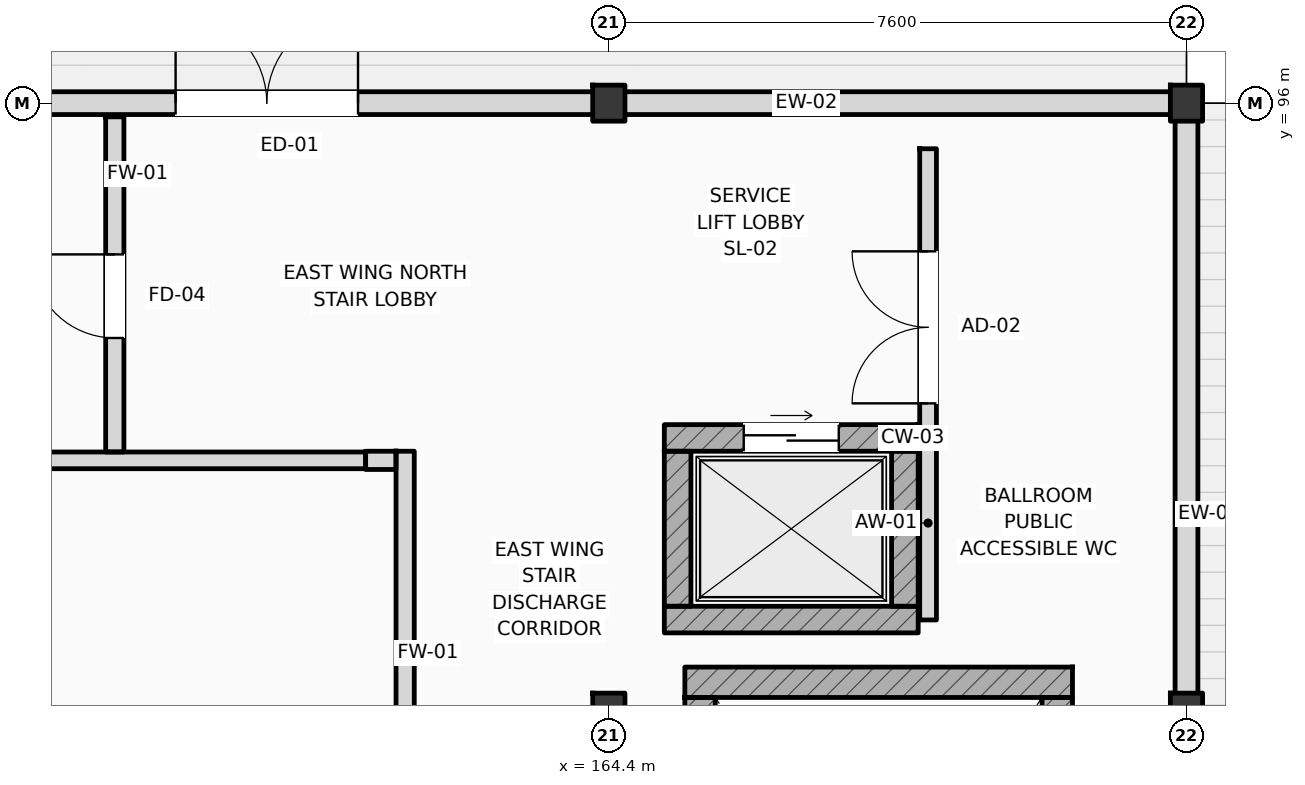
"""IFC4 building model, lengths in metres.
Left out: names, types, materials, properties, quantities, classifications, styles, units other than length and angle.
Written with IfcOpenShell. Run it as: python <this file> out.ifc"""

import sys

from ifc_helpers import new_model, si_unit, direction, frame, frame_2d, origin, origin_2d, place, context, subcontext, project, spatial, rectangle, i_section, extrude, element, fill, save


model = new_model("IFC4")
c1 = context("Model", 3, precision=1e-05, world=origin(), true_north=direction((0.0, 1.0)))
c2 = subcontext(c1, "Body", "Model", "MODEL_VIEW")
j1 = project(units=[si_unit("LENGTHUNIT", "METRE"), si_unit("PLANEANGLEUNIT", "RADIAN")], contexts=[c1])
p1 = place(None, origin())
s1 = spatial("IfcSite", under=j1, at=p1, CompositionType="ELEMENT")
p2 = place(p1, origin())
s2 = spatial("IfcBuilding", under=s1, at=p2, CompositionType="ELEMENT")
p3 = place(p2, origin())
s3 = spatial("IfcBuildingStorey", under=s2, at=p3, CompositionType="ELEMENT", Elevation=0.0)
for number, where, z_axis, x_axis in (
    (1, (164.4, 88.0, 0.0), (0.0, 0.0, 1.0), (1.0, 0.0, 0.0)),
    (2, (164.4, 96.0, 0.0), (0.0, 0.0, 1.0), (1.0, 0.0, 0.0)),
    (3, (172.0, 88.0, 0.0), (0.0, 0.0, 1.0), (1.0, 0.0, 0.0)),
    (4, (172.0, 96.0, 0.0), (0.0, 0.0, 1.0), (1.0, 0.0, 0.0)),
):
    element("IfcColumn", number, at=place(p3, frame(where, z_axis=z_axis, x_axis=x_axis)), inside=s3, PredefinedType="COLUMN", context=c2, shape_type="SweptSolid", body=[
        extrude(i_section(OverallWidth=0.424, OverallDepth=0.474, WebThickness=0.045, FlangeThickness=0.055, FilletRadius=0.015, at=origin_2d()), origin(), (0.0, 0.0, 1.0), 6.0),
    ])
p4 = place(p3, frame((165.4, 88.38, 0.0), z_axis=(0.0, 0.0, 1.0), x_axis=(1.0, 0.0, 0.0)))
e5 = element("IfcWall", 5, at=p4, inside=s3, PredefinedType="SHEAR", context=c2, shape_type="SweptSolid", body=[
    extrude(rectangle(XDim=5.1, YDim=0.4, at=frame_2d((2.55, 0.0))), origin(), (0.0, 0.0, 1.0), 6.0),
])
p5 = place(p3, frame((165.6, 79.6, 0.0), z_axis=(0.0, 0.0, 1.0), x_axis=(0.0, 1.0, 0.0)))
e6 = element("IfcWall", 6, at=p5, inside=s3, PredefinedType="SHEAR", context=c2, shape_type="SweptSolid", body=[
    extrude(rectangle(XDim=8.58, YDim=0.4, at=frame_2d((4.29, 0.0))), origin(), (0.0, 0.0, 1.0), 6.0),
])
p6 = place(p5, frame((0.225, 0.0, 0.0)))
e7 = element("IfcOpeningElement", 7, at=p6, cuts=e6, PredefinedType="OPENING", context=c2, shape_type="SweptSolid", body=[
    extrude(rectangle(XDim=1.6, YDim=2.2, at=frame_2d((0.8, 1.1))), frame((0.0, 0.21, 0.0), z_axis=(0.0, -1.0, 0.0), x_axis=(1.0, 0.0, 0.0)), (0.0, 0.0, 1.0), 0.42),
])
p7 = place(p3, frame((170.3, 79.6, 0.0), z_axis=(0.0, 0.0, 1.0), x_axis=(0.0, 1.0, 0.0)))
e8 = element("IfcWall", 8, at=p7, inside=s3, PredefinedType="SHEAR", context=c2, shape_type="SweptSolid", body=[
    extrude(rectangle(XDim=8.58, YDim=0.4, at=frame_2d((4.29, 0.0))), origin(), (0.0, 0.0, 1.0), 6.0),
])
p8 = place(p3, frame((155.4, 96.0, 0.0), z_axis=(0.0, 0.0, 1.0), x_axis=(1.0, 0.0, 0.0)))
e9 = element("IfcWall", 9, at=p8, inside=s3, PredefinedType="STANDARD", context=c2, shape_type="SweptSolid", body=[
    extrude(rectangle(XDim=9.0, YDim=0.3, at=frame_2d((4.5, 0.0))), origin(), (0.0, 0.0, 1.0), 5.09),
])
p9 = place(p8, frame((3.3, 0.0, 0.0)))
e10 = element("IfcOpeningElement", 10, at=p9, cuts=e9, PredefinedType="OPENING", context=c2, shape_type="SweptSolid", body=[
    extrude(rectangle(XDim=2.4, YDim=2.6, at=frame_2d((1.2, 1.3))), frame((0.0, 0.16, 0.0), z_axis=(0.0, -1.0, 0.0), x_axis=(1.0, 0.0, 0.0)), (0.0, 0.0, 1.0), 0.32),
])
p10 = place(p3, frame((164.4, 96.0, 0.0), z_axis=(0.0, 0.0, 1.0), x_axis=(1.0, 0.0, 0.0)))
e11 = element("IfcWall", 11, at=p10, inside=s3, PredefinedType="STANDARD", context=c2, shape_type="SweptSolid", body=[
    extrude(rectangle(XDim=7.6, YDim=0.3, at=frame_2d((3.8, 0.0))), origin(), (0.0, 0.0, 1.0), 5.19),
])
p11 = place(p3, frame((172.0, 88.0, 0.0), z_axis=(0.0, 0.0, 1.0), x_axis=(0.0, 1.0, 0.0)))
e12 = element("IfcWall", 12, at=p11, inside=s3, PredefinedType="STANDARD", context=c2, shape_type="SweptSolid", body=[
    extrude(rectangle(XDim=8.0, YDim=0.3, at=frame_2d((4.0, 0.0))), origin(), (0.0, 0.0, 1.0), 5.24),
])
p12 = place(p3, frame((165.13, 91.595, 0.0), z_axis=(0.0, 0.0, 1.0), x_axis=(1.0, 0.0, 0.0)))
e13 = element("IfcWall", 13, at=p12, inside=s3, PredefinedType="SHEAR", context=c2, shape_type="SweptSolid", body=[
    extrude(rectangle(XDim=3.34, YDim=0.35, at=frame_2d((1.67, 0.0))), origin(), (0.0, 0.0, 1.0), 5.7),
])
p13 = place(p12, frame((1.045, 0.0, 0.0)))
e14 = element("IfcOpeningElement", 14, at=p13, cuts=e13, PredefinedType="OPENING", context=c2, shape_type="SweptSolid", body=[
    extrude(rectangle(XDim=1.25, YDim=2.25, at=frame_2d((0.625, 1.125))), frame((0.0, 0.185, 0.0), z_axis=(0.0, -1.0, 0.0), x_axis=(1.0, 0.0, 0.0)), (0.0, 0.0, 1.0), 0.37),
])
p14 = place(p3, frame((165.13, 89.205, 0.0), z_axis=(0.0, 0.0, 1.0), x_axis=(1.0, 0.0, 0.0)))
e15 = element("IfcWall", 15, at=p14, inside=s3, PredefinedType="SHEAR", context=c2, shape_type="SweptSolid", body=[
    extrude(rectangle(XDim=3.34, YDim=0.35, at=frame_2d((1.67, 0.0))), origin(), (0.0, 0.0, 1.0), 5.7),
])
for number, where, z_axis, x_axis in (
    (16, (165.305, 89.38, 0.0), (0.0, 0.0, 1.0), (0.0, 1.0, 0.0)),
    (17, (168.295, 89.38, 0.0), (0.0, 0.0, 1.0), (0.0, 1.0, 0.0)),
):
    element("IfcWall", number, at=place(p3, frame(where, z_axis=z_axis, x_axis=x_axis)), inside=s3, PredefinedType="SHEAR", context=c2, shape_type="SweptSolid", body=[
        extrude(rectangle(XDim=2.04, YDim=0.35, at=frame_2d((1.02, 0.0))), origin(), (0.0, 0.0, 1.0), 5.7),
    ])
p15 = place(p3, frame((129.0, 91.3, 0.0), z_axis=(0.0, 0.0, 1.0), x_axis=(1.0, 0.0, 0.0)))
e18 = element("IfcWall", 18, at=p15, inside=s3, PredefinedType="PARTITIONING", context=c2, shape_type="SweptSolid", body=[
    extrude(rectangle(XDim=32.2, YDim=0.22, at=frame_2d((16.1, 0.0))), origin(), (0.0, 0.0, 1.0), 5.7),
])
p16 = place(p15, frame((15.1, 0.0, 0.0)))
e19 = element("IfcOpeningElement", 19, at=p16, cuts=e18, PredefinedType="OPENING", context=c2, shape_type="SweptSolid", body=[
    extrude(rectangle(XDim=2.0, YDim=2.35, at=frame_2d((1.0, 1.175))), frame((0.0, 0.12, 0.0), z_axis=(0.0, -1.0, 0.0), x_axis=(1.0, 0.0, 0.0)), (0.0, 0.0, 1.0), 0.24),
])
p17 = place(p3, frame((168.6, 89.2, 0.0), z_axis=(0.0, 0.0, 1.0), x_axis=(0.0, 1.0, 0.0)))
e20 = element("IfcWall", 20, at=p17, inside=s3, PredefinedType="PARTITIONING", context=c2, shape_type="SweptSolid", body=[
    extrude(rectangle(XDim=6.2, YDim=0.22, at=frame_2d((3.1, 0.0))), origin(), (0.0, 0.0, 1.0), 5.7),
])
p18 = place(p17, frame((2.85, 0.0, 0.0)))
e21 = element("IfcOpeningElement", 21, at=p18, cuts=e20, PredefinedType="OPENING", context=c2, shape_type="SweptSolid", body=[
    extrude(rectangle(XDim=2.0, YDim=2.35, at=frame_2d((1.0, 1.175))), frame((0.0, 0.12, 0.0), z_axis=(0.0, -1.0, 0.0), x_axis=(1.0, 0.0, 0.0)), (0.0, 0.0, 1.0), 0.24),
])
p19 = place(p3, frame((161.72, 79.4, 0.0), z_axis=(0.0, 0.0, 1.0), x_axis=(0.0, 1.0, 0.0)))
e22 = element("IfcWall", 22, at=p19, inside=s3, PredefinedType="STANDARD", context=c2, shape_type="SweptSolid", body=[
    extrude(rectangle(XDim=12.02, YDim=0.24, at=frame_2d((6.01, 0.0))), origin(), (0.0, 0.0, 1.0), 5.7),
])
p20 = place(p19, frame((4.8, 0.0, 0.0)))
e23 = element("IfcOpeningElement", 23, at=p20, cuts=e22, PredefinedType="OPENING", context=c2, shape_type="SweptSolid", body=[
    extrude(rectangle(XDim=1.6, YDim=2.2, at=frame_2d((0.8, 1.1))), frame((0.0, 0.13, 0.0), z_axis=(0.0, -1.0, 0.0), x_axis=(1.0, 0.0, 0.0)), (0.0, 0.0, 1.0), 0.26),
])
p21 = place(p3, frame((157.9, 91.41, 0.0), z_axis=(0.0, 0.0, 1.0), x_axis=(0.0, 1.0, 0.0)))
e24 = element("IfcWall", 24, at=p21, inside=s3, PredefinedType="STANDARD", context=c2, shape_type="SweptSolid", body=[
    extrude(rectangle(XDim=4.41, YDim=0.24, at=frame_2d((2.205, 0.0))), origin(), (0.0, 0.0, 1.0), 5.7),
])
p22 = place(p21, frame((1.5, 0.0, 0.0)))
e25 = element("IfcOpeningElement", 25, at=p22, cuts=e24, PredefinedType="OPENING", context=c2, shape_type="SweptSolid", body=[
    extrude(rectangle(XDim=1.1, YDim=2.2, at=frame_2d((0.55, 1.1))), frame((0.0, 0.13, 0.0), z_axis=(0.0, -1.0, 0.0), x_axis=(1.0, 0.0, 0.0)), (0.0, 0.0, 1.0), 0.26),
])
p23 = place(p3, frame((161.2, 91.3, 0.0), z_axis=(0.0, 0.0, 1.0), x_axis=(1.0, 0.0, 0.0)))
e26 = element("IfcWall", 26, at=p23, inside=s3, PredefinedType="STANDARD", context=c2, shape_type="SweptSolid", body=[
    extrude(rectangle(XDim=0.4, YDim=0.24, at=frame_2d((0.2, 0.0))), origin(), (0.0, 0.0, 1.0), 5.7),
])
p24 = place(p9, origin())
e27 = element("IfcDoor", 27, at=p24, inside=s3, OperationType="DOUBLE_SWING_LEFT", PredefinedType="DOOR", context=c2, shape_type="SweptSolid", body=[
    extrude(rectangle(XDim=2.4, YDim=2.6, at=frame_2d((1.2, 1.3))), frame((0.0, 0.025, 0.0), z_axis=(0.0, -1.0, 0.0), x_axis=(1.0, 0.0, 0.0)), (0.0, 0.0, 1.0), 0.05),
])
fill(e10, e27)
p25 = place(p13, origin())
e28 = element("IfcDoor", 28, at=p25, inside=s3, OperationType="SLIDING_TO_LEFT", PredefinedType="DOOR", context=c2, shape_type="SweptSolid", body=[
    extrude(rectangle(XDim=1.25, YDim=2.25, at=frame_2d((0.625, 1.125))), frame((0.0, 0.025, 0.0), z_axis=(0.0, -1.0, 0.0), x_axis=(1.0, 0.0, 0.0)), (0.0, 0.0, 1.0), 0.05),
])
fill(e14, e28)
p26 = place(p18, origin())
e29 = element("IfcDoor", 29, at=p26, inside=s3, OperationType="DOUBLE_SWING_LEFT", PredefinedType="DOOR", context=c2, shape_type="SweptSolid", body=[
    extrude(rectangle(XDim=2.0, YDim=2.35, at=frame_2d((1.0, 1.175))), frame((0.0, 0.025, 0.0), z_axis=(0.0, -1.0, 0.0), x_axis=(1.0, 0.0, 0.0)), (0.0, 0.0, 1.0), 0.05),
])
fill(e21, e29)
p27 = place(p22, origin())
e30 = element("IfcDoor", 30, at=p27, inside=s3, OperationType="SINGLE_SWING_RIGHT", PredefinedType="DOOR", context=c2, shape_type="SweptSolid", body=[
    extrude(rectangle(XDim=1.1, YDim=2.2, at=frame_2d((0.55, 1.1))), frame((0.0, 0.025, 0.0), z_axis=(0.0, -1.0, 0.0), x_axis=(1.0, 0.0, 0.0)), (0.0, 0.0, 1.0), 0.05),
])
fill(e25, e30)
save(model, sys.argv[1])
